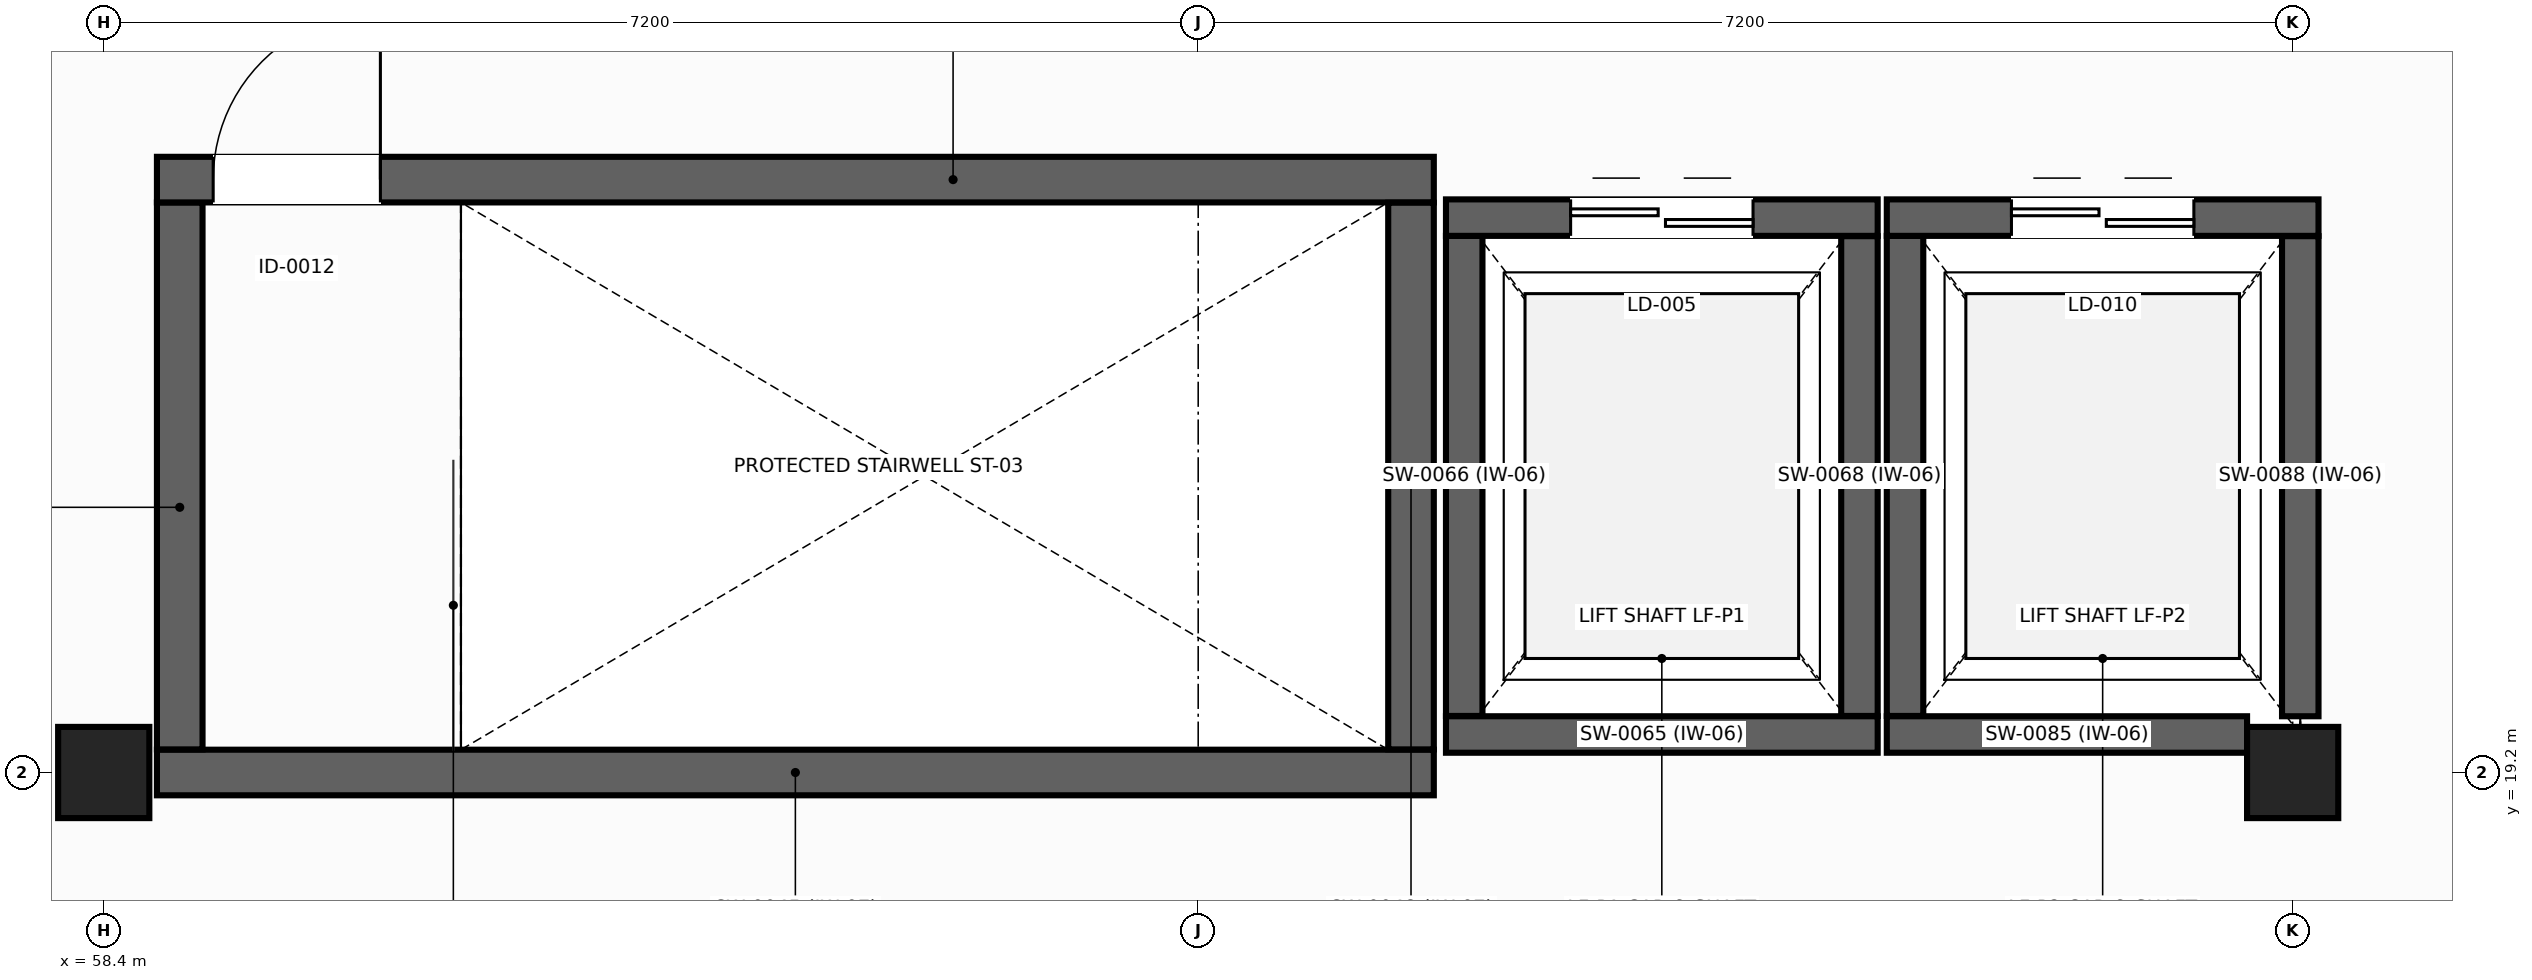
"""IFC4 building model, lengths in metres.
Left out: names, types, materials, properties, quantities, classifications, styles, units other than length and angle.
Written with IfcOpenShell. Run it as: python <this file> out.ifc"""

import sys

from ifc_helpers import new_model, si_unit, direction, frame, frame_2d, origin, origin_2d, place, context, subcontext, project, spatial, rectangle, extrude, element, fill, save


model = new_model("IFC4")
c1 = context("Model", 3, precision=1e-05, world=origin(), true_north=direction((0.0, 1.0)))
c2 = subcontext(c1, "Body", "Model", "MODEL_VIEW")
j1 = project(units=[si_unit("LENGTHUNIT", "METRE"), si_unit("PLANEANGLEUNIT", "RADIAN")], contexts=[c1])
p1 = place(None, origin())
s1 = spatial("IfcSite", under=j1, at=p1, CompositionType="ELEMENT")
p2 = place(p1, origin())
s2 = spatial("IfcBuilding", under=s1, at=p2, CompositionType="ELEMENT")
p3 = place(p2, frame((0.0, 0.0, 14.4)))
s3 = spatial("IfcBuildingStorey", under=s2, at=p3, CompositionType="ELEMENT", Elevation=14.4)
for number, where, z_axis, x_axis in (
    (1, (58.4, 19.2, 0.0), (0.0, 0.0, 1.0), (0.0, 1.0, 0.0)),
    (2, (72.8, 19.2, 0.0), (0.0, 0.0, 1.0), (1.0, 0.0, 0.0)),
):
    element("IfcColumn", number, at=place(p3, frame(where, z_axis=z_axis, x_axis=x_axis)), inside=s3, PredefinedType="COLUMN", context=c2, shape_type="SweptSolid", body=[
        extrude(rectangle(XDim=0.6, YDim=0.6, at=origin_2d()), origin(), (0.0, 0.0, 1.0), 4.28),
    ])
p4 = place(p3, frame((67.15, 19.2, 0.0), z_axis=(0.0, 0.0, 1.0), x_axis=(-1.0, 0.0, 0.0)))
e3 = element("IfcWall", 3, at=p4, inside=s3, PredefinedType="SHEAR", context=c2, shape_type="SweptSolid", body=[
    extrude(rectangle(XDim=8.4, YDim=0.3, at=frame_2d((4.2, 0.0))), origin(), (0.0, 0.0, 1.0), 4.28),
])
p5 = place(p3, frame((58.9, 19.352, 0.0), z_axis=(0.0, 0.0, 1.0), x_axis=(0.0, 1.0, 0.0)))
e4 = element("IfcWall", 4, at=p5, inside=s3, PredefinedType="SHEAR", context=c2, shape_type="SweptSolid", body=[
    extrude(rectangle(XDim=3.598, YDim=0.3, at=frame_2d((1.799, 0.0))), origin(), (0.0, 0.0, 1.0), 4.28),
])
p6 = place(p3, frame((58.75, 23.1, 0.0), z_axis=(0.0, 0.0, 1.0), x_axis=(1.0, 0.0, 0.0)))
e5 = element("IfcWall", 5, at=p6, inside=s3, PredefinedType="SHEAR", context=c2, shape_type="SweptSolid", body=[
    extrude(rectangle(XDim=8.4, YDim=0.3, at=frame_2d((4.2, 0.0))), origin(), (0.0, 0.0, 1.0), 4.28),
])
p7 = place(p6, frame((0.37, 0.0, 0.0)))
e6 = element("IfcOpeningElement", 6, at=p7, cuts=e5, PredefinedType="OPENING", context=c2, shape_type="SweptSolid", body=[
    extrude(rectangle(XDim=1.1, YDim=2.15, at=frame_2d((0.55, 1.075))), frame((0.0, 0.16, 0.0), z_axis=(0.0, -1.0, 0.0), x_axis=(1.0, 0.0, 0.0)), (0.0, 0.0, 1.0), 0.32),
])
p8 = place(p3, frame((67.0, 22.948, 0.0), z_axis=(0.0, 0.0, 1.0), x_axis=(0.0, -1.0, 0.0)))
e7 = element("IfcWall", 7, at=p8, inside=s3, PredefinedType="SHEAR", context=c2, shape_type="SweptSolid", body=[
    extrude(rectangle(XDim=3.596, YDim=0.3, at=frame_2d((1.798, 0.0))), origin(), (0.0, 0.0, 1.0), 4.28),
])
p9 = place(p3, frame((70.07, 19.45, 0.0), z_axis=(0.0, 0.0, 1.0), x_axis=(-1.0, 0.0, 0.0)))
e8 = element("IfcWall", 8, at=p9, inside=s3, PredefinedType="SHEAR", context=c2, shape_type="SweptSolid", body=[
    extrude(rectangle(XDim=2.84, YDim=0.24, at=frame_2d((1.42, 0.0))), origin(), (0.0, 0.0, 1.0), 4.28),
])
p10 = place(p3, frame((67.35, 19.572, 0.0), z_axis=(0.0, 0.0, 1.0), x_axis=(0.0, 1.0, 0.0)))
e9 = element("IfcWall", 9, at=p10, inside=s3, PredefinedType="SHEAR", context=c2, shape_type="SweptSolid", body=[
    extrude(rectangle(XDim=3.158, YDim=0.24, at=frame_2d((1.579, 0.0))), origin(), (0.0, 0.0, 1.0), 4.28),
])
p11 = place(p3, frame((67.23, 22.85, 0.0), z_axis=(0.0, 0.0, 1.0), x_axis=(1.0, 0.0, 0.0)))
e10 = element("IfcWall", 10, at=p11, inside=s3, PredefinedType="SHEAR", context=c2, shape_type="SweptSolid", body=[
    extrude(rectangle(XDim=2.84, YDim=0.24, at=frame_2d((1.42, 0.0))), origin(), (0.0, 0.0, 1.0), 4.28),
])
p12 = place(p11, frame((0.82, 0.0, 0.0)))
e11 = element("IfcOpeningElement", 11, at=p12, cuts=e10, PredefinedType="OPENING", context=c2, shape_type="SweptSolid", body=[
    extrude(rectangle(XDim=1.2, YDim=2.15, at=frame_2d((0.6, 1.075))), frame((0.0, 0.13, 0.0), z_axis=(0.0, -1.0, 0.0), x_axis=(1.0, 0.0, 0.0)), (0.0, 0.0, 1.0), 0.26),
])
p13 = place(p3, frame((69.95, 22.728, 0.0), z_axis=(0.0, 0.0, 1.0), x_axis=(0.0, -1.0, 0.0)))
e12 = element("IfcWall", 12, at=p13, inside=s3, PredefinedType="SHEAR", context=c2, shape_type="SweptSolid", body=[
    extrude(rectangle(XDim=3.156, YDim=0.24, at=frame_2d((1.578, 0.0))), origin(), (0.0, 0.0, 1.0), 4.28),
])
p14 = place(p3, frame((72.5, 19.45, 0.0), z_axis=(0.0, 0.0, 1.0), x_axis=(-1.0, 0.0, 0.0)))
e13 = element("IfcWall", 13, at=p14, inside=s3, PredefinedType="SHEAR", context=c2, shape_type="SweptSolid", body=[
    extrude(rectangle(XDim=2.37, YDim=0.24, at=frame_2d((1.185, 0.0))), origin(), (0.0, 0.0, 1.0), 4.28),
])
p15 = place(p3, frame((70.25, 19.572, 0.0), z_axis=(0.0, 0.0, 1.0), x_axis=(0.0, 1.0, 0.0)))
e14 = element("IfcWall", 14, at=p15, inside=s3, PredefinedType="SHEAR", context=c2, shape_type="SweptSolid", body=[
    extrude(rectangle(XDim=3.158, YDim=0.24, at=frame_2d((1.579, 0.0))), origin(), (0.0, 0.0, 1.0), 4.28),
])
p16 = place(p3, frame((70.13, 22.85, 0.0), z_axis=(0.0, 0.0, 1.0), x_axis=(1.0, 0.0, 0.0)))
e15 = element("IfcWall", 15, at=p16, inside=s3, PredefinedType="SHEAR", context=c2, shape_type="SweptSolid", body=[
    extrude(rectangle(XDim=2.84, YDim=0.24, at=frame_2d((1.42, 0.0))), origin(), (0.0, 0.0, 1.0), 4.28),
])
p17 = place(p16, frame((0.82, 0.0, 0.0)))
e16 = element("IfcOpeningElement", 16, at=p17, cuts=e15, PredefinedType="OPENING", context=c2, shape_type="SweptSolid", body=[
    extrude(rectangle(XDim=1.2, YDim=2.15, at=frame_2d((0.6, 1.075))), frame((0.0, 0.13, 0.0), z_axis=(0.0, -1.0, 0.0), x_axis=(1.0, 0.0, 0.0)), (0.0, 0.0, 1.0), 0.26),
])
p18 = place(p3, frame((72.85, 22.728, 0.0), z_axis=(0.0, 0.0, 1.0), x_axis=(0.0, -1.0, 0.0)))
e17 = element("IfcWall", 17, at=p18, inside=s3, PredefinedType="SHEAR", context=c2, shape_type="SweptSolid", body=[
    extrude(rectangle(XDim=3.158, YDim=0.24, at=frame_2d((1.579, 0.0))), origin(), (0.0, 0.0, 1.0), 4.28),
])
p19 = place(p7, origin())
e18 = element("IfcDoor", 18, at=p19, inside=s3, OperationType="SINGLE_SWING_RIGHT", PredefinedType="DOOR", context=c2, shape_type="SweptSolid", body=[
    extrude(rectangle(XDim=1.1, YDim=2.15, at=frame_2d((0.55, 1.075))), frame((0.0, 0.025, 0.0), z_axis=(0.0, -1.0, 0.0), x_axis=(1.0, 0.0, 0.0)), (0.0, 0.0, 1.0), 0.05),
])
fill(e6, e18)
p20 = place(p12, origin())
e19 = element("IfcDoor", 19, at=p20, inside=s3, OperationType="DOUBLE_DOOR_SLIDING", PredefinedType="DOOR", context=c2, shape_type="SweptSolid", body=[
    extrude(rectangle(XDim=1.2, YDim=2.15, at=frame_2d((0.6, 1.075))), frame((0.0, 0.025, 0.0), z_axis=(0.0, -1.0, 0.0), x_axis=(1.0, 0.0, 0.0)), (0.0, 0.0, 1.0), 0.05),
])
fill(e11, e19)
p21 = place(p17, origin())
e20 = element("IfcDoor", 20, at=p21, inside=s3, OperationType="DOUBLE_DOOR_SLIDING", PredefinedType="DOOR", context=c2, shape_type="SweptSolid", body=[
    extrude(rectangle(XDim=1.2, YDim=2.15, at=frame_2d((0.6, 1.075))), frame((0.0, 0.025, 0.0), z_axis=(0.0, -1.0, 0.0), x_axis=(1.0, 0.0, 0.0)), (0.0, 0.0, 1.0), 0.05),
])
fill(e16, e20)
save(model, sys.argv[1])
